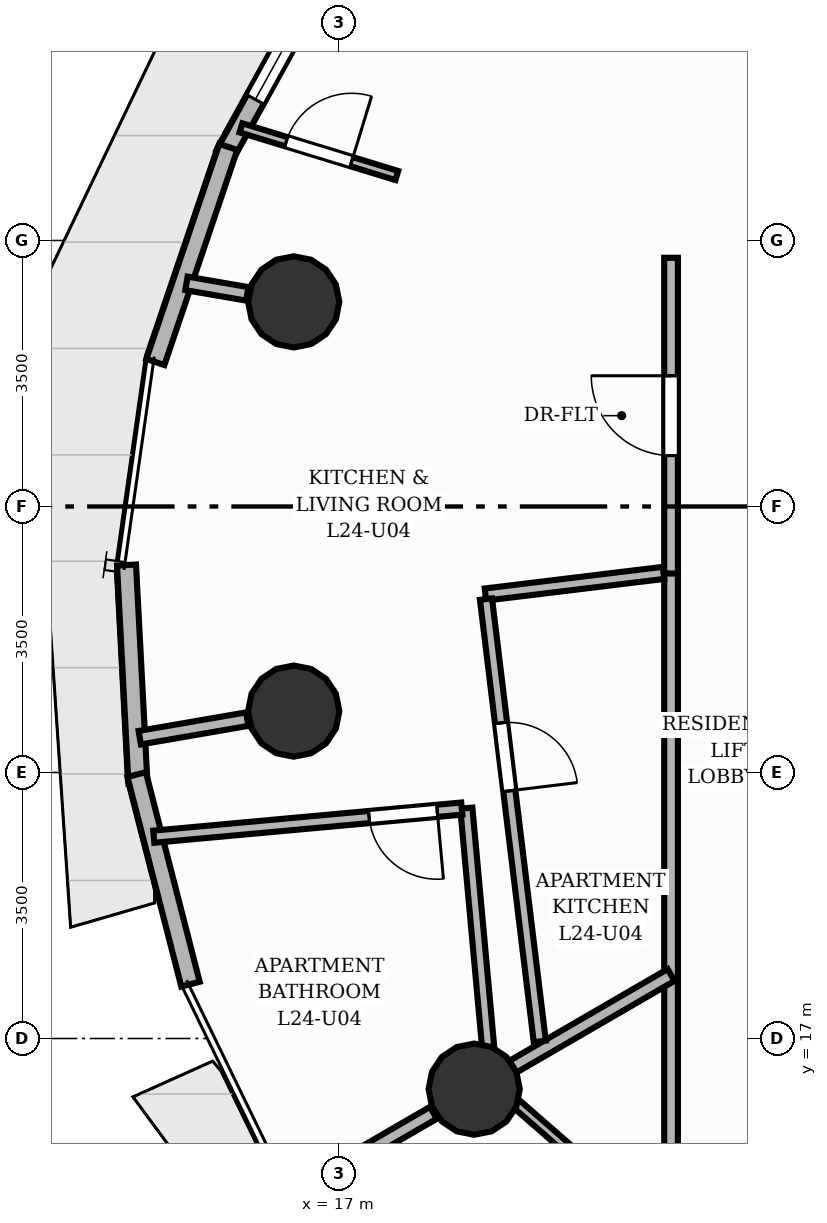
"""IFC4 building model, lengths in metres.
Left out: names, types, materials, properties, quantities, classifications, styles, units other than length and angle.
Written with IfcOpenShell. Run it as: python <this file> out.ifc"""

import sys

from ifc_helpers import new_model, si_unit, direction, frame, frame_2d, origin, origin_2d, place, context, subcontext, project, spatial, rectangle, circle, extrude, element, fill, save


model = new_model("IFC4")
c1 = context("Model", 3, precision=1e-05, world=origin(), true_north=direction((0.0, 1.0)))
c2 = subcontext(c1, "Body", "Model", "MODEL_VIEW")
j1 = project(units=[si_unit("LENGTHUNIT", "METRE"), si_unit("PLANEANGLEUNIT", "RADIAN")], contexts=[c1])
p1 = place(None, origin())
s1 = spatial("IfcSite", under=j1, at=p1, CompositionType="ELEMENT")
p2 = place(p1, origin())
s2 = spatial("IfcBuilding", under=s1, at=p2, CompositionType="ELEMENT")
p3 = place(p2, frame((0.0, 0.0, 83.68)))
s3 = spatial("IfcBuildingStorey", under=s2, at=p3, CompositionType="ELEMENT", Elevation=83.68)
for number, where, z_axis, x_axis in (
    (1, (16.406, 26.692, 0.0), (0.0, 0.0, 1.0), (1.0, 0.0, 0.0)),
    (2, (16.406, 21.308, 0.0), (0.0, 0.0, 1.0), (1.0, 0.0, 0.0)),
    (3, (18.78, 16.333, 0.0), (0.0, 0.0, 1.0), (1.0, 0.0, 0.0)),
):
    element("IfcColumn", number, at=place(p3, frame(where, z_axis=z_axis, x_axis=x_axis)), inside=s3, PredefinedType="COLUMN", context=c2, shape_type="SweptSolid", body=[
        extrude(circle(Radius=0.6, at=origin_2d()), origin(), (0.0, 0.0, 1.0), 3.2),
    ])
p4 = place(p3, frame((15.5, 28.629, 0.0), z_axis=(0.0, 0.0, 1.0), x_axis=(0.482904421948, 0.875673066426, 0.0)))
e4 = element("IfcWall", 4, at=p4, inside=s3, PredefinedType="SOLIDWALL", context=c2, shape_type="SweptSolid", body=[
    extrude(rectangle(XDim=3.061, YDim=0.25, at=frame_2d((1.53, 0.0))), origin(), (0.0, 0.0, 1.0), 2.96),
])
p5 = place(p4, frame((0.83, 0.0, 0.85)))
e5 = element("IfcOpeningElement", 5, at=p5, cuts=e4, PredefinedType="OPENING", context=c2, shape_type="SweptSolid", body=[
    extrude(rectangle(XDim=1.4, YDim=1.55, at=frame_2d((0.7, 0.775))), frame((0.0, 0.135, 0.0), z_axis=(0.0, -1.0, 0.0), x_axis=(1.0, 0.0, 0.0)), (0.0, 0.0, 1.0), 0.27),
])
p6 = place(p3, frame((14.585, 25.901, 0.0), z_axis=(0.0, 0.0, 1.0), x_axis=(0.321149814784, 0.947028403198, 0.0)))
e6 = element("IfcWall", 6, at=p6, inside=s3, PredefinedType="SOLIDWALL", context=c2, shape_type="SweptSolid", body=[
    extrude(rectangle(XDim=2.988, YDim=0.25, at=frame_2d((1.494, 0.0))), origin(), (0.0, 0.0, 1.0), 2.96),
])
p7 = place(p3, frame((14.356, 20.36, 0.0), z_axis=(0.0, 0.0, 1.0), x_axis=(-0.052411702269, 0.998625562193, 0.0)))
e7 = element("IfcWall", 7, at=p7, inside=s3, PredefinedType="SOLIDWALL", context=c2, shape_type="SweptSolid", body=[
    extrude(rectangle(XDim=2.874, YDim=0.25, at=frame_2d((1.437, 0.0))), origin(), (0.0, 0.0, 1.0), 2.96),
])
p8 = place(p3, frame((15.047, 17.715, 0.0), z_axis=(0.0, 0.0, 1.0), x_axis=(-0.248825035787, 0.96854845081, 0.0)))
e8 = element("IfcWall", 8, at=p8, inside=s3, PredefinedType="SOLIDWALL", context=c2, shape_type="SweptSolid", body=[
    extrude(rectangle(XDim=2.847, YDim=0.25, at=frame_2d((1.424, 0.0))), origin(), (0.0, 0.0, 1.0), 2.96),
])
p9 = place(p3, frame((15.794, 26.798, 0.0), z_axis=(0.0, 0.0, 1.0), x_axis=(-0.985418430365, 0.170148514822, 0.0)))
e9 = element("IfcWall", 9, at=p9, inside=s3, PredefinedType="PARTITIONING", context=c2, shape_type="SweptSolid", body=[
    extrude(rectangle(XDim=0.812, YDim=0.18, at=frame_2d((0.406, 0.0))), origin(), (0.0, 0.0, 1.0), 2.261),
])
p10 = place(p3, frame((15.794, 21.202, 0.0), z_axis=(0.0, 0.0, 1.0), x_axis=(-0.985402123708, -0.170242928172, 0.0)))
e10 = element("IfcWall", 10, at=p10, inside=s3, PredefinedType="PARTITIONING", context=c2, shape_type="SweptSolid", body=[
    extrude(rectangle(XDim=1.436, YDim=0.18, at=frame_2d((0.718, 0.0))), origin(), (0.0, 0.0, 1.0), 2.261),
])
p11 = place(p3, frame((18.243, 16.022, 0.0), z_axis=(0.0, 0.0, 1.0), x_axis=(-0.865046065875, -0.501692439563, 0.0)))
e11 = element("IfcWall", 11, at=p11, inside=s3, PredefinedType="PARTITIONING", context=c2, shape_type="SweptSolid", body=[
    extrude(rectangle(XDim=1.994, YDim=0.18, at=frame_2d((0.997, 0.0))), origin(), (0.0, 0.0, 1.0), 2.261),
])
p12 = place(p3, frame((21.37, 15.43, 0.0), z_axis=(0.0, 0.0, 1.0), x_axis=(0.0, 1.0, 0.0)))
e12 = element("IfcWall", 12, at=p12, inside=s3, PredefinedType="PARTITIONING", context=c2, shape_type="SweptSolid", body=[
    extrude(rectangle(XDim=7.727, YDim=0.18, at=frame_2d((3.863, 0.0))), origin(), (0.0, 0.0, 1.0), 2.955),
])
p13 = place(p3, frame((21.37, 23.118, 0.0), z_axis=(0.0, 0.0, 1.0), x_axis=(0.0, 1.0, 0.0)))
e13 = element("IfcWall", 13, at=p13, inside=s3, PredefinedType="PARTITIONING", context=c2, shape_type="SweptSolid", body=[
    extrude(rectangle(XDim=4.154, YDim=0.18, at=frame_2d((2.077, 0.0))), origin(), (0.0, 0.0, 1.0), 2.955),
])
p14 = place(p13, frame((1.552, 0.0, 0.0)))
e14 = element("IfcOpeningElement", 14, at=p14, cuts=e13, PredefinedType="OPENING", context=c2, shape_type="SweptSolid", body=[
    extrude(rectangle(XDim=1.05, YDim=2.15, at=frame_2d((0.525, 1.075))), frame((0.0, 0.1, 0.0), z_axis=(0.0, -1.0, 0.0), x_axis=(1.0, 0.0, 0.0)), (0.0, 0.0, 1.0), 0.2),
])
p15 = place(p3, frame((22.888, 13.04, 0.0), z_axis=(0.0, 0.0, 1.0), x_axis=(-0.753425123405, 0.657533712765, 0.0)))
e15 = element("IfcWall", 15, at=p15, inside=s3, PredefinedType="PARTITIONING", context=c2, shape_type="SweptSolid", body=[
    extrude(rectangle(XDim=4.72, YDim=0.125, at=frame_2d((2.36, 0.0))), origin(), (0.0, 0.0, 1.0), 2.404),
])
p16 = place(p15, frame((1.49, 0.0, 0.0)))
e16 = element("IfcOpeningElement", 16, at=p16, cuts=e15, PredefinedType="OPENING", context=c2, shape_type="SweptSolid", body=[
    extrude(rectangle(XDim=0.9, YDim=2.1, at=frame_2d((0.45, 1.05))), frame((0.0, 0.073, 0.0), z_axis=(0.0, -1.0, 0.0), x_axis=(1.0, 0.0, 0.0)), (0.0, 0.0, 1.0), 0.145),
])
p17 = place(p3, frame((19.288, 16.628, 0.0), z_axis=(0.0, 0.0, 1.0), x_axis=(0.86502326608, 0.501731750182, 0.0)))
e17 = element("IfcWall", 17, at=p17, inside=s3, PredefinedType="PARTITIONING", context=c2, shape_type="SweptSolid", body=[
    extrude(rectangle(XDim=2.407, YDim=0.18, at=frame_2d((1.204, 0.0))), origin(), (0.0, 0.0, 1.0), 2.261),
])
p18 = place(p3, frame((18.964, 16.887, 0.0), z_axis=(0.0, 0.0, 1.0), x_axis=(-0.091023836021, 0.995848714051, 0.0)))
e18 = element("IfcWall", 18, at=p18, inside=s3, PredefinedType="PLUMBINGWALL", context=c2, shape_type="SweptSolid", body=[
    extrude(rectangle(XDim=3.157, YDim=0.16, at=frame_2d((1.579, 0.0))), origin(), (0.0, 0.0, 1.0), 2.955),
])
p19 = place(p3, frame((18.616, 20.025, 0.0), z_axis=(0.0, 0.0, 1.0), x_axis=(-0.995848823867, -0.091022634561, 0.0)))
e19 = element("IfcWall", 19, at=p19, inside=s3, PredefinedType="PLUMBINGWALL", context=c2, shape_type="SweptSolid", body=[
    extrude(rectangle(XDim=4.069, YDim=0.16, at=frame_2d((2.034, 0.0))), origin(), (0.0, 0.0, 1.0), 2.641),
])
p20 = place(p19, frame((0.324, 0.0, 0.0)))
e20 = element("IfcOpeningElement", 20, at=p20, cuts=e19, PredefinedType="OPENING", context=c2, shape_type="SweptSolid", body=[
    extrude(rectangle(XDim=0.9, YDim=2.1, at=frame_2d((0.45, 1.05))), frame((0.0, 0.09, 0.0), z_axis=(0.0, -1.0, 0.0), x_axis=(1.0, 0.0, 0.0)), (0.0, 0.0, 1.0), 0.18),
])
p21 = place(p3, frame((15.712, 28.982, 0.0), z_axis=(0.0, 0.0, 1.0), x_axis=(0.956248079097, -0.292557022175, 0.0)))
e21 = element("IfcWall", 21, at=p21, inside=s3, PredefinedType="PARTITIONING", context=c2, shape_type="SweptSolid", body=[
    extrude(rectangle(XDim=2.144, YDim=0.125, at=frame_2d((1.072, 0.0))), origin(), (0.0, 0.0, 1.0), 2.641),
])
p22 = place(p21, frame((0.622, 0.0, 0.0)))
e22 = element("IfcOpeningElement", 22, at=p22, cuts=e21, PredefinedType="OPENING", context=c2, shape_type="SweptSolid", body=[
    extrude(rectangle(XDim=0.9, YDim=2.1, at=frame_2d((0.45, 1.05))), frame((0.0, 0.073, 0.0), z_axis=(0.0, -1.0, 0.0), x_axis=(1.0, 0.0, 0.0)), (0.0, 0.0, 1.0), 0.145),
])
p23 = place(p3, frame((21.271, 23.126, 0.0), z_axis=(0.0, 0.0, 1.0), x_axis=(-0.992687653986, -0.120711315224, 0.0)))
e23 = element("IfcWall", 23, at=p23, inside=s3, PredefinedType="PLUMBINGWALL", context=c2, shape_type="SweptSolid", body=[
    extrude(rectangle(XDim=2.36, YDim=0.16, at=frame_2d((1.18, 0.0))), origin(), (0.0, 0.0, 1.0), 2.955),
])
p24 = place(p3, frame((18.935, 22.782, 0.0), z_axis=(0.0, 0.0, 1.0), x_axis=(0.120703145243, -0.992688647426, 0.0)))
e24 = element("IfcWall", 24, at=p24, inside=s3, PredefinedType="PLUMBINGWALL", context=c2, shape_type="SweptSolid", body=[
    extrude(rectangle(XDim=5.864, YDim=0.16, at=frame_2d((2.932, 0.0))), origin(), (0.0, 0.0, 1.0), 2.955),
])
p25 = place(p24, frame((1.642, 0.0, 0.0)))
e25 = element("IfcOpeningElement", 25, at=p25, cuts=e24, PredefinedType="OPENING", context=c2, shape_type="SweptSolid", body=[
    extrude(rectangle(XDim=0.9, YDim=2.1, at=frame_2d((0.45, 1.05))), frame((0.0, 0.09, 0.0), z_axis=(0.0, -1.0, 0.0), x_axis=(1.0, 0.0, 0.0)), (0.0, 0.0, 1.0), 0.18),
])
p26 = place(p5, origin())
e26 = element("IfcWindow", 26, at=p26, inside=s3, PartitioningType="SINGLE_PANEL", PredefinedType="WINDOW", context=c2, shape_type="SweptSolid", body=[
    extrude(rectangle(XDim=1.4, YDim=1.55, at=frame_2d((0.7, 0.775))), frame((0.0, 0.03, 0.0), z_axis=(0.0, -1.0, 0.0), x_axis=(1.0, 0.0, 0.0)), (0.0, 0.0, 1.0), 0.06),
])
fill(e5, e26)
p27 = place(p14, origin())
e27 = element("IfcDoor", 27, at=p27, inside=s3, OperationType="SINGLE_SWING_RIGHT", PredefinedType="DOOR", context=c2, shape_type="SweptSolid", body=[
    extrude(rectangle(XDim=1.05, YDim=2.15, at=frame_2d((0.525, 1.075))), frame((0.0, 0.025, 0.0), z_axis=(0.0, -1.0, 0.0), x_axis=(1.0, 0.0, 0.0)), (0.0, 0.0, 1.0), 0.05),
])
fill(e14, e27)
p28 = place(p20, origin())
e28 = element("IfcDoor", 28, at=p28, inside=s3, OperationType="SINGLE_SWING_LEFT", PredefinedType="DOOR", context=c2, shape_type="SweptSolid", body=[
    extrude(rectangle(XDim=0.9, YDim=2.1, at=frame_2d((0.45, 1.05))), frame((0.0, 0.025, 0.0), z_axis=(0.0, -1.0, 0.0), x_axis=(1.0, 0.0, 0.0)), (0.0, 0.0, 1.0), 0.05),
])
fill(e20, e28)
p29 = place(p22, origin())
e29 = element("IfcDoor", 29, at=p29, inside=s3, OperationType="SINGLE_SWING_RIGHT", PredefinedType="DOOR", context=c2, shape_type="SweptSolid", body=[
    extrude(rectangle(XDim=0.9, YDim=2.1, at=frame_2d((0.45, 1.05))), frame((0.0, 0.025, 0.0), z_axis=(0.0, -1.0, 0.0), x_axis=(1.0, 0.0, 0.0)), (0.0, 0.0, 1.0), 0.05),
])
fill(e22, e29)
p30 = place(p25, origin())
e30 = element("IfcDoor", 30, at=p30, inside=s3, OperationType="SINGLE_SWING_RIGHT", PredefinedType="DOOR", context=c2, shape_type="SweptSolid", body=[
    extrude(rectangle(XDim=0.9, YDim=2.1, at=frame_2d((0.45, 1.05))), frame((0.0, 0.025, 0.0), z_axis=(0.0, -1.0, 0.0), x_axis=(1.0, 0.0, 0.0)), (0.0, 0.0, 1.0), 0.05),
])
fill(e25, e30)
save(model, sys.argv[1])
